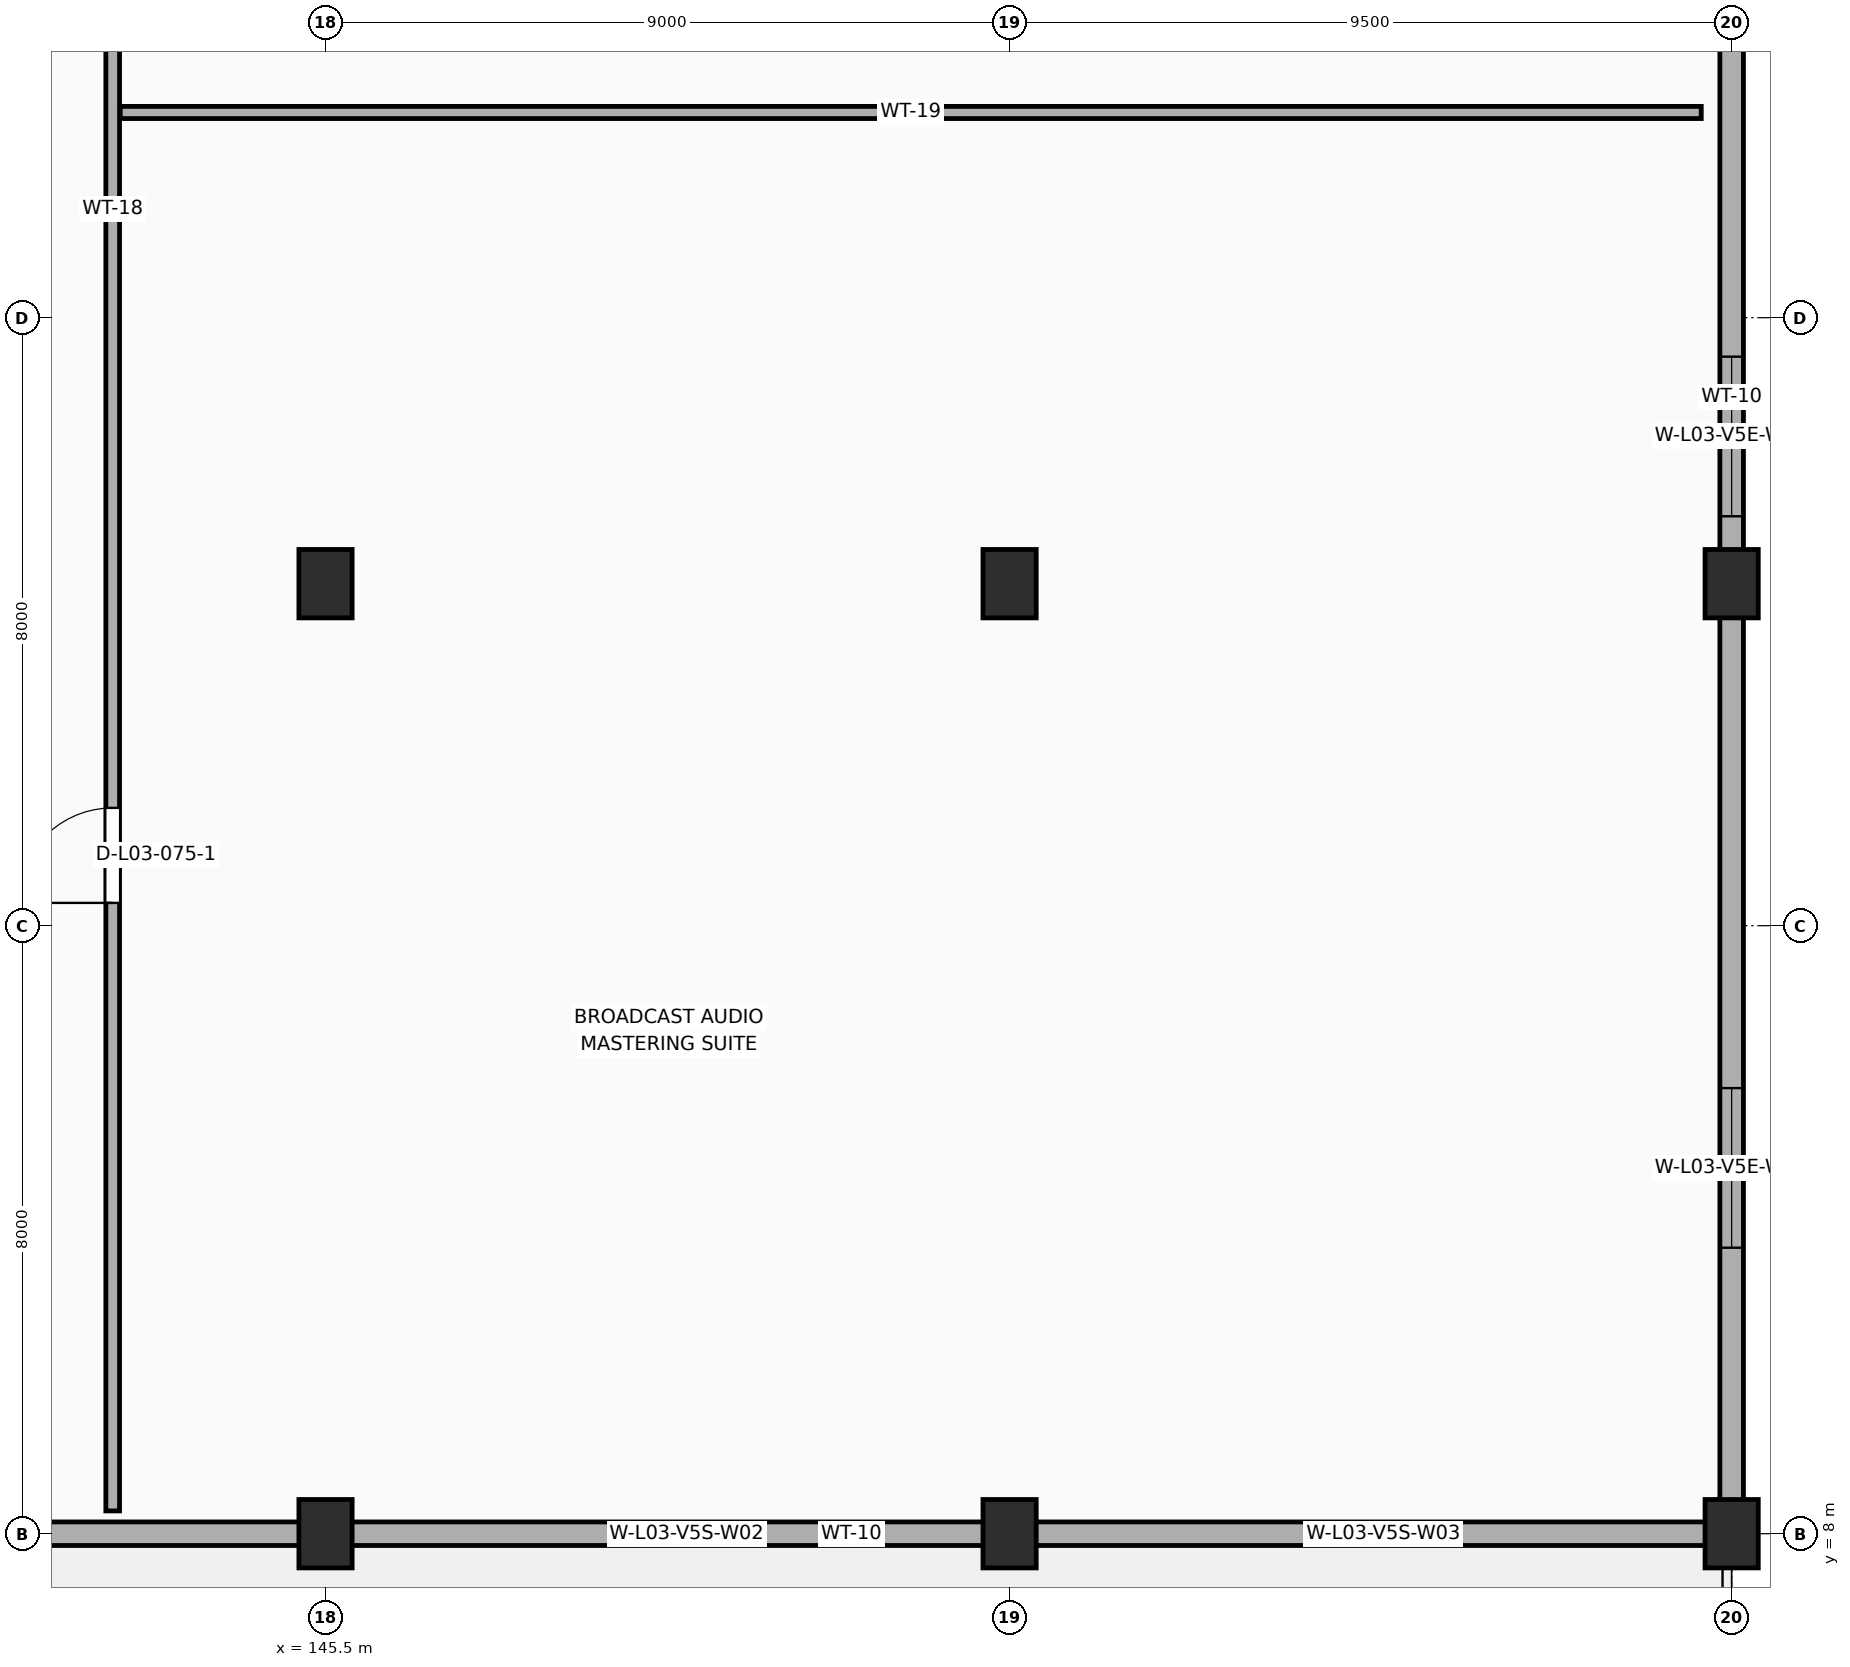
"""IFC4 building model, lengths in metres.
Left out: names, types, materials, properties, quantities, classifications, styles, units other than length and angle.
Written with IfcOpenShell. Run it as: python <this file> out.ifc"""

import sys

from ifc_helpers import new_model, si_unit, direction, frame, frame_2d, origin, origin_2d, place, context, subcontext, project, spatial, rectangle, extrude, element, fill, save


model = new_model("IFC4")
c1 = context("Model", 3, precision=1e-05, world=origin(), true_north=direction((0.0, 1.0)))
c2 = subcontext(c1, "Body", "Model", "MODEL_VIEW")
j1 = project(units=[si_unit("LENGTHUNIT", "METRE"), si_unit("PLANEANGLEUNIT", "RADIAN")], contexts=[c1])
p1 = place(None, origin())
s1 = spatial("IfcSite", under=j1, at=p1, CompositionType="ELEMENT")
p2 = place(p1, origin())
s2 = spatial("IfcBuilding", under=s1, at=p2, CompositionType="ELEMENT")
p3 = place(p2, frame((0.0, 0.0, 15.0)))
s3 = spatial("IfcBuildingStorey", under=s2, at=p3, CompositionType="ELEMENT", Elevation=15.0)
for number, where, z_axis, x_axis in (
    (1, (145.5, 8.0, 0.0), (0.0, 0.0, 1.0), (1.0, 0.0, 0.0)),
    (2, (145.5, 20.5, 0.0), (0.0, 0.0, 1.0), (1.0, 0.0, 0.0)),
    (3, (154.5, 8.0, 0.0), (0.0, 0.0, 1.0), (1.0, 0.0, 0.0)),
    (4, (154.5, 20.5, 0.0), (0.0, 0.0, 1.0), (1.0, 0.0, 0.0)),
    (5, (164.0, 8.0, 0.0), (0.0, 0.0, 1.0), (1.0, 0.0, 0.0)),
    (6, (164.0, 20.5, 0.0), (0.0, 0.0, 1.0), (1.0, 0.0, 0.0)),
):
    element("IfcColumn", number, at=place(p3, frame(where, z_axis=z_axis, x_axis=x_axis)), inside=s3, PredefinedType="COLUMN", context=c2, shape_type="SweptSolid", body=[
        extrude(rectangle(XDim=0.7, YDim=0.9, at=origin_2d()), origin(), (0.0, 0.0, 1.0), 4.53),
    ])
p4 = place(p3, frame((136.5, 8.0, 0.0), z_axis=(0.0, 0.0, 1.0), x_axis=(1.0, 0.0, 0.0)))
e7 = element("IfcWall", 7, at=p4, inside=s3, PredefinedType="STANDARD", context=c2, shape_type="SweptSolid", body=[
    extrude(rectangle(XDim=27.5, YDim=0.31, at=frame_2d((13.75, 0.0))), origin(), (0.0, 0.0, 1.0), 3.924),
])
p5 = place(p4, frame((2.2, 0.0, 0.0)))
e8 = element("IfcOpeningElement", 8, at=p5, cuts=e7, PredefinedType="OPENING", context=c2, shape_type="SweptSolid", body=[
    extrude(rectangle(XDim=1.6, YDim=2.3, at=frame_2d((0.8, 1.15))), frame((0.0, 0.167, 0.0), z_axis=(0.0, -1.0, 0.0), x_axis=(1.0, 0.0, 0.0)), (0.0, 0.0, 1.0), 0.334),
])
p6 = place(p4, frame((12.95, 0.0, 1.0)))
e9 = element("IfcOpeningElement", 9, at=p6, cuts=e7, PredefinedType="OPENING", context=c2, shape_type="SweptSolid", body=[
    extrude(rectangle(XDim=1.6, YDim=2.2, at=frame_2d((0.8, 1.1))), frame((0.0, 0.167, 0.0), z_axis=(0.0, -1.0, 0.0), x_axis=(1.0, 0.0, 0.0)), (0.0, 0.0, 1.0), 0.334),
])
p7 = place(p4, frame((22.117, 0.0, 1.0)))
e10 = element("IfcOpeningElement", 10, at=p7, cuts=e7, PredefinedType="OPENING", context=c2, shape_type="SweptSolid", body=[
    extrude(rectangle(XDim=1.6, YDim=2.2, at=frame_2d((0.8, 1.1))), frame((0.0, 0.167, 0.0), z_axis=(0.0, -1.0, 0.0), x_axis=(1.0, 0.0, 0.0)), (0.0, 0.0, 1.0), 0.334),
])
p8 = place(p3, frame((164.0, 8.0, 0.0), z_axis=(0.0, 0.0, 1.0), x_axis=(0.0, 1.0, 0.0)))
e11 = element("IfcWall", 11, at=p8, inside=s3, PredefinedType="STANDARD", context=c2, shape_type="SweptSolid", body=[
    extrude(rectangle(XDim=38.5, YDim=0.31, at=frame_2d((19.25, 0.0))), origin(), (0.0, 0.0, 1.0), 3.67),
])
p9 = place(p8, frame((3.763, 0.0, 0.9)))
e12 = element("IfcOpeningElement", 12, at=p9, cuts=e11, PredefinedType="OPENING", context=c2, shape_type="SweptSolid", body=[
    extrude(rectangle(XDim=2.1, YDim=1.8, at=frame_2d((1.05, 0.9))), frame((0.0, 0.167, 0.0), z_axis=(0.0, -1.0, 0.0), x_axis=(1.0, 0.0, 0.0)), (0.0, 0.0, 1.0), 0.334),
])
p10 = place(p8, frame((13.387, 0.0, 0.9)))
e13 = element("IfcOpeningElement", 13, at=p10, cuts=e11, PredefinedType="OPENING", context=c2, shape_type="SweptSolid", body=[
    extrude(rectangle(XDim=2.1, YDim=1.8, at=frame_2d((1.05, 0.9))), frame((0.0, 0.167, 0.0), z_axis=(0.0, -1.0, 0.0), x_axis=(1.0, 0.0, 0.0)), (0.0, 0.0, 1.0), 0.334),
])
p11 = place(p8, frame((23.012, 0.0, 0.9)))
e14 = element("IfcOpeningElement", 14, at=p11, cuts=e11, PredefinedType="OPENING", context=c2, shape_type="SweptSolid", body=[
    extrude(rectangle(XDim=2.1, YDim=1.8, at=frame_2d((1.05, 0.9))), frame((0.0, 0.167, 0.0), z_axis=(0.0, -1.0, 0.0), x_axis=(1.0, 0.0, 0.0)), (0.0, 0.0, 1.0), 0.334),
])
p12 = place(p8, frame((32.638, 0.0, 0.9)))
e15 = element("IfcOpeningElement", 15, at=p12, cuts=e11, PredefinedType="OPENING", context=c2, shape_type="SweptSolid", body=[
    extrude(rectangle(XDim=2.1, YDim=1.8, at=frame_2d((1.05, 0.9))), frame((0.0, 0.167, 0.0), z_axis=(0.0, -1.0, 0.0), x_axis=(1.0, 0.0, 0.0)), (0.0, 0.0, 1.0), 0.334),
])
p13 = place(p3, frame((142.7, 8.3, 0.0), z_axis=(0.0, 0.0, 1.0), x_axis=(0.0, 1.0, 0.0)))
e16 = element("IfcWall", 16, at=p13, inside=s3, PredefinedType="PARTITIONING", context=c2, shape_type="SweptSolid", body=[
    extrude(rectangle(XDim=37.7, YDim=0.18, at=frame_2d((18.85, 0.0))), origin(), (0.0, 0.0, 1.0), 4.118),
])
p14 = place(p13, frame((8.0, 0.0, 0.0)))
e17 = element("IfcOpeningElement", 17, at=p14, cuts=e16, PredefinedType="OPENING", context=c2, shape_type="SweptSolid", body=[
    extrude(rectangle(XDim=1.25, YDim=2.25, at=frame_2d((0.625, 1.125))), frame((0.0, 0.102, 0.0), z_axis=(0.0, -1.0, 0.0), x_axis=(1.0, 0.0, 0.0)), (0.0, 0.0, 1.0), 0.204),
])
p15 = place(p13, frame((25.0, 0.0, 0.0)))
e18 = element("IfcOpeningElement", 18, at=p15, cuts=e16, PredefinedType="OPENING", context=c2, shape_type="SweptSolid", body=[
    extrude(rectangle(XDim=1.1, YDim=2.15, at=frame_2d((0.55, 1.075))), frame((0.0, 0.102, 0.0), z_axis=(0.0, -1.0, 0.0), x_axis=(1.0, 0.0, 0.0)), (0.0, 0.0, 1.0), 0.204),
])
p16 = place(p3, frame((142.8, 26.7, 0.0), z_axis=(0.0, 0.0, 1.0), x_axis=(1.0, 0.0, 0.0)))
e19 = element("IfcWall", 19, at=p16, inside=s3, PredefinedType="PARTITIONING", context=c2, shape_type="SweptSolid", body=[
    extrude(rectangle(XDim=20.8, YDim=0.16, at=frame_2d((10.4, 0.0))), origin(), (0.0, 0.0, 1.0), 4.018),
])
p17 = place(p6, origin())
e20 = element("IfcWindow", 20, at=p17, inside=s3, PartitioningType="SINGLE_PANEL", PredefinedType="WINDOW", context=c2, shape_type="SweptSolid", body=[
    extrude(rectangle(XDim=1.6, YDim=2.2, at=frame_2d((0.8, 1.1))), frame((0.0, 0.03, 0.0), z_axis=(0.0, -1.0, 0.0), x_axis=(1.0, 0.0, 0.0)), (0.0, 0.0, 1.0), 0.06),
])
fill(e9, e20)
p18 = place(p7, origin())
e21 = element("IfcWindow", 21, at=p18, inside=s3, PartitioningType="SINGLE_PANEL", PredefinedType="WINDOW", context=c2, shape_type="SweptSolid", body=[
    extrude(rectangle(XDim=1.6, YDim=2.2, at=frame_2d((0.8, 1.1))), frame((0.0, 0.03, 0.0), z_axis=(0.0, -1.0, 0.0), x_axis=(1.0, 0.0, 0.0)), (0.0, 0.0, 1.0), 0.06),
])
fill(e10, e21)
p19 = place(p9, origin())
e22 = element("IfcWindow", 22, at=p19, inside=s3, PartitioningType="SINGLE_PANEL", PredefinedType="WINDOW", context=c2, shape_type="SweptSolid", body=[
    extrude(rectangle(XDim=2.1, YDim=1.8, at=frame_2d((1.05, 0.9))), frame((0.0, 0.03, 0.0), z_axis=(0.0, -1.0, 0.0), x_axis=(1.0, 0.0, 0.0)), (0.0, 0.0, 1.0), 0.06),
])
fill(e12, e22)
p20 = place(p10, origin())
e23 = element("IfcWindow", 23, at=p20, inside=s3, PartitioningType="SINGLE_PANEL", PredefinedType="WINDOW", context=c2, shape_type="SweptSolid", body=[
    extrude(rectangle(XDim=2.1, YDim=1.8, at=frame_2d((1.05, 0.9))), frame((0.0, 0.03, 0.0), z_axis=(0.0, -1.0, 0.0), x_axis=(1.0, 0.0, 0.0)), (0.0, 0.0, 1.0), 0.06),
])
fill(e13, e23)
p21 = place(p14, origin())
e24 = element("IfcDoor", 24, at=p21, inside=s3, OperationType="SINGLE_SWING_LEFT", PredefinedType="DOOR", context=c2, shape_type="SweptSolid", body=[
    extrude(rectangle(XDim=1.25, YDim=2.25, at=frame_2d((0.625, 1.125))), frame((0.0, 0.025, 0.0), z_axis=(0.0, -1.0, 0.0), x_axis=(1.0, 0.0, 0.0)), (0.0, 0.0, 1.0), 0.05),
])
fill(e17, e24)
save(model, sys.argv[1])
